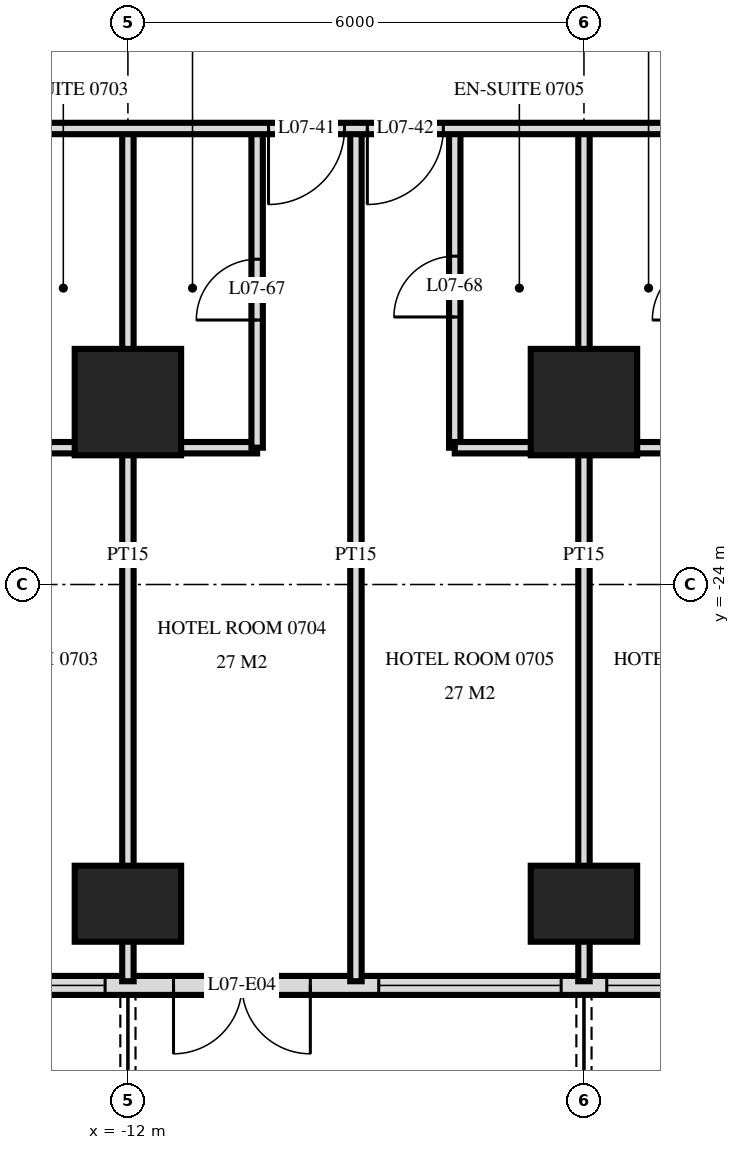
"""IFC4 building model, lengths in metres.
Left out: names, types, materials, properties, quantities, classifications, styles, units other than length and angle.
Written with IfcOpenShell. Run it as: python <this file> out.ifc"""

import sys

from ifc_helpers import new_model, si_unit, direction, frame, frame_2d, origin, origin_2d, place, context, subcontext, project, spatial, rectangle, extrude, element, fill, save


model = new_model("IFC4")
c1 = context("Model", 3, precision=1e-05, world=origin(), true_north=direction((0.0, 1.0)))
c2 = subcontext(c1, "Body", "Model", "MODEL_VIEW")
j1 = project(units=[si_unit("LENGTHUNIT", "METRE"), si_unit("PLANEANGLEUNIT", "RADIAN")], contexts=[c1])
p1 = place(None, origin())
s1 = spatial("IfcSite", under=j1, at=p1, CompositionType="ELEMENT")
p2 = place(p1, origin())
s2 = spatial("IfcBuilding", under=s1, at=p2, CompositionType="ELEMENT")
p3 = place(p2, frame((0.0, 0.0, 34.8)))
s3 = spatial("IfcBuildingStorey", under=s2, at=p3, CompositionType="ELEMENT", Elevation=34.8)
p4 = place(p3, frame((-12.0, -28.2, 0.0), z_axis=(0.0, 0.0, 1.0), x_axis=(1.0, 0.0, 0.0)))
e1 = element("IfcColumn", 1, at=p4, inside=s3, PredefinedType="COLUMN", context=c2, shape_type="SweptSolid", body=[
    extrude(rectangle(XDim=1.4, YDim=1.0, at=origin_2d()), origin(), (0.0, 0.0, 1.0), 3.6),
])
p5 = place(p3, frame((-12.0, -21.6, 0.0), z_axis=(0.0, 0.0, 1.0), x_axis=(1.0, 0.0, 0.0)))
e2 = element("IfcColumn", 2, at=p5, inside=s3, PredefinedType="COLUMN", context=c2, shape_type="SweptSolid", body=[
    extrude(rectangle(XDim=1.4, YDim=1.4, at=origin_2d()), origin(), (0.0, 0.0, 1.0), 3.6),
])
p6 = place(p3, frame((-6.0, -28.2, 0.0), z_axis=(0.0, 0.0, 1.0), x_axis=(1.0, 0.0, 0.0)))
e3 = element("IfcColumn", 3, at=p6, inside=s3, PredefinedType="COLUMN", context=c2, shape_type="SweptSolid", body=[
    extrude(rectangle(XDim=1.4, YDim=1.0, at=origin_2d()), origin(), (0.0, 0.0, 1.0), 3.6),
])
p7 = place(p3, frame((-6.0, -21.6, 0.0), z_axis=(0.0, 0.0, 1.0), x_axis=(1.0, 0.0, 0.0)))
e4 = element("IfcColumn", 4, at=p7, inside=s3, PredefinedType="COLUMN", context=c2, shape_type="SweptSolid", body=[
    extrude(rectangle(XDim=1.4, YDim=1.4, at=origin_2d()), origin(), (0.0, 0.0, 1.0), 3.6),
])
p8 = place(p3, frame((-28.775, -29.275, 0.0), z_axis=(0.0, 0.0, 1.0), x_axis=(1.0, 0.0, 0.0)))
e5 = element("IfcWall", 5, at=p8, inside=s3, PredefinedType="SOLIDWALL", context=c2, shape_type="SweptSolid", body=[
    extrude(rectangle(XDim=57.551, YDim=0.25, at=frame_2d((28.775, 0.0))), origin(), (0.0, 0.0, 1.0), 3.32),
])
p9 = place(p8, frame((0.575, 0.0, 0.0)))
e6 = element("IfcOpeningElement", 6, at=p9, cuts=e5, PredefinedType="OPENING", context=c2, shape_type="SweptSolid", body=[
    extrude(rectangle(XDim=1.8, YDim=2.4, at=frame_2d((0.9, 1.2))), frame((0.0, 0.135, 0.0), z_axis=(0.0, -1.0, 0.0), x_axis=(1.0, 0.0, 0.0)), (0.0, 0.0, 1.0), 0.27),
])
p10 = place(p8, frame((5.375, 0.0, 0.0)))
e7 = element("IfcOpeningElement", 7, at=p10, cuts=e5, PredefinedType="OPENING", context=c2, shape_type="SweptSolid", body=[
    extrude(rectangle(XDim=1.8, YDim=2.4, at=frame_2d((0.9, 1.2))), frame((0.0, 0.135, 0.0), z_axis=(0.0, -1.0, 0.0), x_axis=(1.0, 0.0, 0.0)), (0.0, 0.0, 1.0), 0.27),
])
p11 = place(p8, frame((8.075, 0.0, 0.3)))
e8 = element("IfcOpeningElement", 8, at=p11, cuts=e5, PredefinedType="OPENING", context=c2, shape_type="SweptSolid", body=[
    extrude(rectangle(XDim=2.4, YDim=2.1, at=frame_2d((1.2, 1.05))), frame((0.0, 0.135, 0.0), z_axis=(0.0, -1.0, 0.0), x_axis=(1.0, 0.0, 0.0)), (0.0, 0.0, 1.0), 0.27),
])
p12 = place(p8, frame((11.375, 0.0, 0.0)))
e9 = element("IfcOpeningElement", 9, at=p12, cuts=e5, PredefinedType="OPENING", context=c2, shape_type="SweptSolid", body=[
    extrude(rectangle(XDim=1.8, YDim=2.4, at=frame_2d((0.9, 1.2))), frame((0.0, 0.135, 0.0), z_axis=(0.0, -1.0, 0.0), x_axis=(1.0, 0.0, 0.0)), (0.0, 0.0, 1.0), 0.27),
])
p13 = place(p8, frame((14.075, 0.0, 0.3)))
e10 = element("IfcOpeningElement", 10, at=p13, cuts=e5, PredefinedType="OPENING", context=c2, shape_type="SweptSolid", body=[
    extrude(rectangle(XDim=2.4, YDim=2.1, at=frame_2d((1.2, 1.05))), frame((0.0, 0.135, 0.0), z_axis=(0.0, -1.0, 0.0), x_axis=(1.0, 0.0, 0.0)), (0.0, 0.0, 1.0), 0.27),
])
p14 = place(p8, frame((17.375, 0.0, 0.0)))
e11 = element("IfcOpeningElement", 11, at=p14, cuts=e5, PredefinedType="OPENING", context=c2, shape_type="SweptSolid", body=[
    extrude(rectangle(XDim=1.8, YDim=2.4, at=frame_2d((0.9, 1.2))), frame((0.0, 0.135, 0.0), z_axis=(0.0, -1.0, 0.0), x_axis=(1.0, 0.0, 0.0)), (0.0, 0.0, 1.0), 0.27),
])
p15 = place(p8, frame((20.075, 0.0, 0.3)))
e12 = element("IfcOpeningElement", 12, at=p15, cuts=e5, PredefinedType="OPENING", context=c2, shape_type="SweptSolid", body=[
    extrude(rectangle(XDim=2.4, YDim=2.1, at=frame_2d((1.2, 1.05))), frame((0.0, 0.135, 0.0), z_axis=(0.0, -1.0, 0.0), x_axis=(1.0, 0.0, 0.0)), (0.0, 0.0, 1.0), 0.27),
])
p16 = place(p8, frame((23.075, 0.0, 0.3)))
e13 = element("IfcOpeningElement", 13, at=p16, cuts=e5, PredefinedType="OPENING", context=c2, shape_type="SweptSolid", body=[
    extrude(rectangle(XDim=2.4, YDim=2.1, at=frame_2d((1.2, 1.05))), frame((0.0, 0.135, 0.0), z_axis=(0.0, -1.0, 0.0), x_axis=(1.0, 0.0, 0.0)), (0.0, 0.0, 1.0), 0.27),
])
p17 = place(p8, frame((26.375, 0.0, 0.0)))
e14 = element("IfcOpeningElement", 14, at=p17, cuts=e5, PredefinedType="OPENING", context=c2, shape_type="SweptSolid", body=[
    extrude(rectangle(XDim=1.8, YDim=2.4, at=frame_2d((0.9, 1.2))), frame((0.0, 0.135, 0.0), z_axis=(0.0, -1.0, 0.0), x_axis=(1.0, 0.0, 0.0)), (0.0, 0.0, 1.0), 0.27),
])
p18 = place(p8, frame((29.375, 0.0, 0.0)))
e15 = element("IfcOpeningElement", 15, at=p18, cuts=e5, PredefinedType="OPENING", context=c2, shape_type="SweptSolid", body=[
    extrude(rectangle(XDim=1.8, YDim=2.4, at=frame_2d((0.9, 1.2))), frame((0.0, 0.135, 0.0), z_axis=(0.0, -1.0, 0.0), x_axis=(1.0, 0.0, 0.0)), (0.0, 0.0, 1.0), 0.27),
])
p19 = place(p8, frame((32.075, 0.0, 0.3)))
e16 = element("IfcOpeningElement", 16, at=p19, cuts=e5, PredefinedType="OPENING", context=c2, shape_type="SweptSolid", body=[
    extrude(rectangle(XDim=2.4, YDim=2.1, at=frame_2d((1.2, 1.05))), frame((0.0, 0.135, 0.0), z_axis=(0.0, -1.0, 0.0), x_axis=(1.0, 0.0, 0.0)), (0.0, 0.0, 1.0), 0.27),
])
p20 = place(p8, frame((35.375, 0.0, 0.0)))
e17 = element("IfcOpeningElement", 17, at=p20, cuts=e5, PredefinedType="OPENING", context=c2, shape_type="SweptSolid", body=[
    extrude(rectangle(XDim=1.8, YDim=2.4, at=frame_2d((0.9, 1.2))), frame((0.0, 0.135, 0.0), z_axis=(0.0, -1.0, 0.0), x_axis=(1.0, 0.0, 0.0)), (0.0, 0.0, 1.0), 0.27),
])
p21 = place(p8, frame((38.075, 0.0, 0.3)))
e18 = element("IfcOpeningElement", 18, at=p21, cuts=e5, PredefinedType="OPENING", context=c2, shape_type="SweptSolid", body=[
    extrude(rectangle(XDim=2.4, YDim=2.1, at=frame_2d((1.2, 1.05))), frame((0.0, 0.135, 0.0), z_axis=(0.0, -1.0, 0.0), x_axis=(1.0, 0.0, 0.0)), (0.0, 0.0, 1.0), 0.27),
])
p22 = place(p8, frame((41.375, 0.0, 0.0)))
e19 = element("IfcOpeningElement", 19, at=p22, cuts=e5, PredefinedType="OPENING", context=c2, shape_type="SweptSolid", body=[
    extrude(rectangle(XDim=1.8, YDim=2.4, at=frame_2d((0.9, 1.2))), frame((0.0, 0.135, 0.0), z_axis=(0.0, -1.0, 0.0), x_axis=(1.0, 0.0, 0.0)), (0.0, 0.0, 1.0), 0.27),
])
p23 = place(p8, frame((44.075, 0.0, 0.3)))
e20 = element("IfcOpeningElement", 20, at=p23, cuts=e5, PredefinedType="OPENING", context=c2, shape_type="SweptSolid", body=[
    extrude(rectangle(XDim=2.4, YDim=2.1, at=frame_2d((1.2, 1.05))), frame((0.0, 0.135, 0.0), z_axis=(0.0, -1.0, 0.0), x_axis=(1.0, 0.0, 0.0)), (0.0, 0.0, 1.0), 0.27),
])
p24 = place(p8, frame((47.375, 0.0, 0.0)))
e21 = element("IfcOpeningElement", 21, at=p24, cuts=e5, PredefinedType="OPENING", context=c2, shape_type="SweptSolid", body=[
    extrude(rectangle(XDim=1.8, YDim=2.4, at=frame_2d((0.9, 1.2))), frame((0.0, 0.135, 0.0), z_axis=(0.0, -1.0, 0.0), x_axis=(1.0, 0.0, 0.0)), (0.0, 0.0, 1.0), 0.27),
])
p25 = place(p8, frame((50.075, 0.0, 0.3)))
e22 = element("IfcOpeningElement", 22, at=p25, cuts=e5, PredefinedType="OPENING", context=c2, shape_type="SweptSolid", body=[
    extrude(rectangle(XDim=2.4, YDim=2.1, at=frame_2d((1.2, 1.05))), frame((0.0, 0.135, 0.0), z_axis=(0.0, -1.0, 0.0), x_axis=(1.0, 0.0, 0.0)), (0.0, 0.0, 1.0), 0.27),
])
p26 = place(p8, frame((53.375, 0.0, 0.0)))
e23 = element("IfcOpeningElement", 23, at=p26, cuts=e5, PredefinedType="OPENING", context=c2, shape_type="SweptSolid", body=[
    extrude(rectangle(XDim=1.8, YDim=2.4, at=frame_2d((0.9, 1.2))), frame((0.0, 0.135, 0.0), z_axis=(0.0, -1.0, 0.0), x_axis=(1.0, 0.0, 0.0)), (0.0, 0.0, 1.0), 0.27),
])
p27 = place(p3, frame((-6.0, -29.22, 0.0), z_axis=(0.0, 0.0, 1.0), x_axis=(0.0, 1.0, 0.0)))
e24 = element("IfcWall", 24, at=p27, inside=s3, PredefinedType="PARTITIONING", context=c2, shape_type="SweptSolid", body=[
    extrude(rectangle(XDim=11.22, YDim=0.15, at=frame_2d((5.61, 0.0))), origin(), (0.0, 0.0, 1.0), 3.32),
])
p28 = place(p3, frame((-7.7, -22.2, 0.0), z_axis=(0.0, 0.0, 1.0), x_axis=(0.0, 1.0, 0.0)))
e25 = element("IfcWall", 25, at=p28, inside=s3, PredefinedType="PARTITIONING", context=c2, shape_type="SweptSolid", body=[
    extrude(rectangle(XDim=4.2, YDim=0.15, at=frame_2d((2.1, 0.0))), origin(), (0.0, 0.0, 1.0), 3.32),
])
p29 = place(p28, frame((1.72, 0.0, 0.0)))
e26 = element("IfcOpeningElement", 26, at=p29, cuts=e25, PredefinedType="OPENING", context=c2, shape_type="SweptSolid", body=[
    extrude(rectangle(XDim=0.8, YDim=2.1, at=frame_2d((0.4, 1.05))), frame((0.0, 0.085, 0.0), z_axis=(0.0, -1.0, 0.0), x_axis=(1.0, 0.0, 0.0)), (0.0, 0.0, 1.0), 0.17),
])
p30 = place(p3, frame((-9.0, -29.22, 0.0), z_axis=(0.0, 0.0, 1.0), x_axis=(0.0, 1.0, 0.0)))
e27 = element("IfcWall", 27, at=p30, inside=s3, PredefinedType="PARTITIONING", context=c2, shape_type="SweptSolid", body=[
    extrude(rectangle(XDim=11.22, YDim=0.15, at=frame_2d((5.61, 0.0))), origin(), (0.0, 0.0, 1.0), 3.32),
])
p31 = place(p3, frame((-10.3, -22.2, 0.0), z_axis=(0.0, 0.0, 1.0), x_axis=(0.0, 1.0, 0.0)))
e28 = element("IfcWall", 28, at=p31, inside=s3, PredefinedType="PARTITIONING", context=c2, shape_type="SweptSolid", body=[
    extrude(rectangle(XDim=4.2, YDim=0.15, at=frame_2d((2.1, 0.0))), origin(), (0.0, 0.0, 1.0), 3.32),
])
p32 = place(p31, frame((1.68, 0.0, 0.0)))
e29 = element("IfcOpeningElement", 29, at=p32, cuts=e28, PredefinedType="OPENING", context=c2, shape_type="SweptSolid", body=[
    extrude(rectangle(XDim=0.8, YDim=2.1, at=frame_2d((0.4, 1.05))), frame((0.0, 0.085, 0.0), z_axis=(0.0, -1.0, 0.0), x_axis=(1.0, 0.0, 0.0)), (0.0, 0.0, 1.0), 0.17),
])
p33 = place(p3, frame((-12.0, -29.22, 0.0), z_axis=(0.0, 0.0, 1.0), x_axis=(0.0, 1.0, 0.0)))
e30 = element("IfcWall", 30, at=p33, inside=s3, PredefinedType="PARTITIONING", context=c2, shape_type="SweptSolid", body=[
    extrude(rectangle(XDim=11.22, YDim=0.15, at=frame_2d((5.61, 0.0))), origin(), (0.0, 0.0, 1.0), 3.32),
])
for number, where, z_axis, x_axis in (
    (31, (-13.7, -22.2, 0.0), (0.0, 0.0, 1.0), (1.0, 0.0, 0.0)),
    (32, (-7.7, -22.2, 0.0), (0.0, 0.0, 1.0), (1.0, 0.0, 0.0)),
):
    element("IfcWall", number, at=place(p3, frame(where, z_axis=z_axis, x_axis=x_axis)), inside=s3, PredefinedType="PARTITIONING", context=c2, shape_type="SweptSolid", body=[
        extrude(rectangle(XDim=3.4, YDim=0.15, at=frame_2d((1.7, 0.0))), origin(), (0.0, 0.0, 1.0), 3.32),
    ])
p34 = place(p3, frame((-33.12, -18.0, 0.0), z_axis=(0.0, 0.0, 1.0), x_axis=(1.0, 0.0, 0.0)))
e33 = element("IfcWall", 33, at=p34, inside=s3, PredefinedType="PARTITIONING", context=c2, shape_type="SweptSolid", body=[
    extrude(rectangle(XDim=66.24, YDim=0.15, at=frame_2d((33.12, 0.0))), origin(), (0.0, 0.0, 1.0), 3.32),
])
p35 = place(p34, frame((12.27, 0.0, 0.0)))
e34 = element("IfcOpeningElement", 34, at=p35, cuts=e33, PredefinedType="OPENING", context=c2, shape_type="SweptSolid", body=[
    extrude(rectangle(XDim=1.0, YDim=2.1, at=frame_2d((0.5, 1.05))), frame((0.0, 0.085, 0.0), z_axis=(0.0, -1.0, 0.0), x_axis=(1.0, 0.0, 0.0)), (0.0, 0.0, 1.0), 0.17),
])
p36 = place(p34, frame((16.97, 0.0, 0.0)))
e35 = element("IfcOpeningElement", 35, at=p36, cuts=e33, PredefinedType="OPENING", context=c2, shape_type="SweptSolid", body=[
    extrude(rectangle(XDim=1.0, YDim=2.1, at=frame_2d((0.5, 1.05))), frame((0.0, 0.085, 0.0), z_axis=(0.0, -1.0, 0.0), x_axis=(1.0, 0.0, 0.0)), (0.0, 0.0, 1.0), 0.17),
])
p37 = place(p34, frame((18.27, 0.0, 0.0)))
e36 = element("IfcOpeningElement", 36, at=p37, cuts=e33, PredefinedType="OPENING", context=c2, shape_type="SweptSolid", body=[
    extrude(rectangle(XDim=1.0, YDim=2.1, at=frame_2d((0.5, 1.05))), frame((0.0, 0.085, 0.0), z_axis=(0.0, -1.0, 0.0), x_axis=(1.0, 0.0, 0.0)), (0.0, 0.0, 1.0), 0.17),
])
p38 = place(p34, frame((22.97, 0.0, 0.0)))
e37 = element("IfcOpeningElement", 37, at=p38, cuts=e33, PredefinedType="OPENING", context=c2, shape_type="SweptSolid", body=[
    extrude(rectangle(XDim=1.0, YDim=2.1, at=frame_2d((0.5, 1.05))), frame((0.0, 0.085, 0.0), z_axis=(0.0, -1.0, 0.0), x_axis=(1.0, 0.0, 0.0)), (0.0, 0.0, 1.0), 0.17),
])
p39 = place(p34, frame((24.27, 0.0, 0.0)))
e38 = element("IfcOpeningElement", 38, at=p39, cuts=e33, PredefinedType="OPENING", context=c2, shape_type="SweptSolid", body=[
    extrude(rectangle(XDim=1.0, YDim=2.1, at=frame_2d((0.5, 1.05))), frame((0.0, 0.085, 0.0), z_axis=(0.0, -1.0, 0.0), x_axis=(1.0, 0.0, 0.0)), (0.0, 0.0, 1.0), 0.17),
])
p40 = place(p34, frame((28.97, 0.0, 0.0)))
e39 = element("IfcOpeningElement", 39, at=p40, cuts=e33, PredefinedType="OPENING", context=c2, shape_type="SweptSolid", body=[
    extrude(rectangle(XDim=1.0, YDim=2.1, at=frame_2d((0.5, 1.05))), frame((0.0, 0.085, 0.0), z_axis=(0.0, -1.0, 0.0), x_axis=(1.0, 0.0, 0.0)), (0.0, 0.0, 1.0), 0.17),
])
p41 = place(p34, frame((30.27, 0.0, 0.0)))
e40 = element("IfcOpeningElement", 40, at=p41, cuts=e33, PredefinedType="OPENING", context=c2, shape_type="SweptSolid", body=[
    extrude(rectangle(XDim=1.0, YDim=2.1, at=frame_2d((0.5, 1.05))), frame((0.0, 0.085, 0.0), z_axis=(0.0, -1.0, 0.0), x_axis=(1.0, 0.0, 0.0)), (0.0, 0.0, 1.0), 0.17),
])
p42 = place(p34, frame((34.97, 0.0, 0.0)))
e41 = element("IfcOpeningElement", 41, at=p42, cuts=e33, PredefinedType="OPENING", context=c2, shape_type="SweptSolid", body=[
    extrude(rectangle(XDim=1.0, YDim=2.1, at=frame_2d((0.5, 1.05))), frame((0.0, 0.085, 0.0), z_axis=(0.0, -1.0, 0.0), x_axis=(1.0, 0.0, 0.0)), (0.0, 0.0, 1.0), 0.17),
])
p43 = place(p34, frame((37.27, 0.0, 0.0)))
e42 = element("IfcOpeningElement", 42, at=p43, cuts=e33, PredefinedType="OPENING", context=c2, shape_type="SweptSolid", body=[
    extrude(rectangle(XDim=1.0, YDim=2.1, at=frame_2d((0.5, 1.05))), frame((0.0, 0.085, 0.0), z_axis=(0.0, -1.0, 0.0), x_axis=(1.0, 0.0, 0.0)), (0.0, 0.0, 1.0), 0.17),
])
p44 = place(p34, frame((43.97, 0.0, 0.0)))
e43 = element("IfcOpeningElement", 43, at=p44, cuts=e33, PredefinedType="OPENING", context=c2, shape_type="SweptSolid", body=[
    extrude(rectangle(XDim=1.0, YDim=2.1, at=frame_2d((0.5, 1.05))), frame((0.0, 0.085, 0.0), z_axis=(0.0, -1.0, 0.0), x_axis=(1.0, 0.0, 0.0)), (0.0, 0.0, 1.0), 0.17),
])
p45 = place(p34, frame((45.27, 0.0, 0.0)))
e44 = element("IfcOpeningElement", 44, at=p45, cuts=e33, PredefinedType="OPENING", context=c2, shape_type="SweptSolid", body=[
    extrude(rectangle(XDim=1.0, YDim=2.1, at=frame_2d((0.5, 1.05))), frame((0.0, 0.085, 0.0), z_axis=(0.0, -1.0, 0.0), x_axis=(1.0, 0.0, 0.0)), (0.0, 0.0, 1.0), 0.17),
])
p46 = place(p34, frame((51.22, 0.0, 0.0)))
e45 = element("IfcOpeningElement", 45, at=p46, cuts=e33, PredefinedType="OPENING", context=c2, shape_type="SweptSolid", body=[
    extrude(rectangle(XDim=1.0, YDim=2.1, at=frame_2d((0.5, 1.05))), frame((0.0, 0.085, 0.0), z_axis=(0.0, -1.0, 0.0), x_axis=(1.0, 0.0, 0.0)), (0.0, 0.0, 1.0), 0.17),
])
p47 = place(p34, frame((54.27, 0.0, 0.0)))
e46 = element("IfcOpeningElement", 46, at=p47, cuts=e33, PredefinedType="OPENING", context=c2, shape_type="SweptSolid", body=[
    extrude(rectangle(XDim=1.0, YDim=2.1, at=frame_2d((0.5, 1.05))), frame((0.0, 0.085, 0.0), z_axis=(0.0, -1.0, 0.0), x_axis=(1.0, 0.0, 0.0)), (0.0, 0.0, 1.0), 0.17),
])
p48 = place(p34, frame((6.07, 0.0, 0.0)))
e47 = element("IfcOpeningElement", 47, at=p48, cuts=e33, PredefinedType="OPENING", context=c2, shape_type="SweptSolid", body=[
    extrude(rectangle(XDim=1.0, YDim=2.1, at=frame_2d((0.5, 1.05))), frame((0.0, 0.085, 0.0), z_axis=(0.0, -1.0, 0.0), x_axis=(1.0, 0.0, 0.0)), (0.0, 0.0, 1.0), 0.17),
])
p49 = place(p34, frame((63.37, 0.0, 0.0)))
e48 = element("IfcOpeningElement", 48, at=p49, cuts=e33, PredefinedType="OPENING", context=c2, shape_type="SweptSolid", body=[
    extrude(rectangle(XDim=1.0, YDim=2.1, at=frame_2d((0.5, 1.05))), frame((0.0, 0.085, 0.0), z_axis=(0.0, -1.0, 0.0), x_axis=(1.0, 0.0, 0.0)), (0.0, 0.0, 1.0), 0.17),
])
p50 = place(p13, origin())
e49 = element("IfcWindow", 49, at=p50, inside=s3, PartitioningType="SINGLE_PANEL", PredefinedType="WINDOW", context=c2, shape_type="SweptSolid", body=[
    extrude(rectangle(XDim=2.4, YDim=2.1, at=frame_2d((1.2, 1.05))), frame((0.0, 0.03, 0.0), z_axis=(0.0, -1.0, 0.0), x_axis=(1.0, 0.0, 0.0)), (0.0, 0.0, 1.0), 0.06),
])
fill(e10, e49)
p51 = place(p14, frame((0.9, 0.0, 0.0), z_axis=(0.0, 0.0, 1.0), x_axis=(-1.0, 0.0, 0.0)))
e50 = element("IfcDoor", 50, at=p51, inside=s3, OperationType="DOUBLE_DOOR_SINGLE_SWING", PredefinedType="DOOR", context=c2, shape_type="SweptSolid", body=[
    extrude(rectangle(XDim=1.8, YDim=2.4, at=frame_2d((0.0, 1.2))), frame((0.0, -0.025, 0.0), z_axis=(0.0, 1.0, 0.0), x_axis=(-1.0, 0.0, 0.0)), (0.0, 0.0, 1.0), 0.05),
])
fill(e11, e50)
p52 = place(p15, origin())
e51 = element("IfcWindow", 51, at=p52, inside=s3, PartitioningType="SINGLE_PANEL", PredefinedType="WINDOW", context=c2, shape_type="SweptSolid", body=[
    extrude(rectangle(XDim=2.4, YDim=2.1, at=frame_2d((1.2, 1.05))), frame((0.0, 0.03, 0.0), z_axis=(0.0, -1.0, 0.0), x_axis=(1.0, 0.0, 0.0)), (0.0, 0.0, 1.0), 0.06),
])
fill(e12, e51)
p53 = place(p16, origin())
e52 = element("IfcWindow", 52, at=p53, inside=s3, PartitioningType="SINGLE_PANEL", PredefinedType="WINDOW", context=c2, shape_type="SweptSolid", body=[
    extrude(rectangle(XDim=2.4, YDim=2.1, at=frame_2d((1.2, 1.05))), frame((0.0, 0.03, 0.0), z_axis=(0.0, -1.0, 0.0), x_axis=(1.0, 0.0, 0.0)), (0.0, 0.0, 1.0), 0.06),
])
fill(e13, e52)
p54 = place(p38, frame((0.5, 0.0, 0.0), z_axis=(0.0, 0.0, 1.0), x_axis=(-1.0, 0.0, 0.0)))
e53 = element("IfcDoor", 53, at=p54, inside=s3, OperationType="SINGLE_SWING_LEFT", PredefinedType="DOOR", context=c2, shape_type="SweptSolid", body=[
    extrude(rectangle(XDim=1.0, YDim=2.1, at=frame_2d((0.0, 1.05))), frame((0.0, -0.025, 0.0), z_axis=(0.0, 1.0, 0.0), x_axis=(-1.0, 0.0, 0.0)), (0.0, 0.0, 1.0), 0.05),
])
fill(e37, e53)
p55 = place(p39, frame((0.5, 0.0, 0.0), z_axis=(0.0, 0.0, 1.0), x_axis=(-1.0, 0.0, 0.0)))
e54 = element("IfcDoor", 54, at=p55, inside=s3, OperationType="SINGLE_SWING_LEFT", PredefinedType="DOOR", context=c2, shape_type="SweptSolid", body=[
    extrude(rectangle(XDim=1.0, YDim=2.1, at=frame_2d((0.0, 1.05))), frame((0.0, -0.025, 0.0), z_axis=(0.0, 1.0, 0.0), x_axis=(-1.0, 0.0, 0.0)), (0.0, 0.0, 1.0), 0.05),
])
fill(e38, e54)
p56 = place(p32, origin())
e55 = element("IfcDoor", 55, at=p56, inside=s3, OperationType="SINGLE_SWING_RIGHT", PredefinedType="DOOR", context=c2, shape_type="SweptSolid", body=[
    extrude(rectangle(XDim=0.8, YDim=2.1, at=frame_2d((0.4, 1.05))), frame((0.0, 0.025, 0.0), z_axis=(0.0, -1.0, 0.0), x_axis=(1.0, 0.0, 0.0)), (0.0, 0.0, 1.0), 0.05),
])
fill(e29, e55)
p57 = place(p29, origin())
e56 = element("IfcDoor", 56, at=p57, inside=s3, OperationType="SINGLE_SWING_RIGHT", PredefinedType="DOOR", context=c2, shape_type="SweptSolid", body=[
    extrude(rectangle(XDim=0.8, YDim=2.1, at=frame_2d((0.4, 1.05))), frame((0.0, 0.025, 0.0), z_axis=(0.0, -1.0, 0.0), x_axis=(1.0, 0.0, 0.0)), (0.0, 0.0, 1.0), 0.05),
])
fill(e26, e56)
save(model, sys.argv[1])
